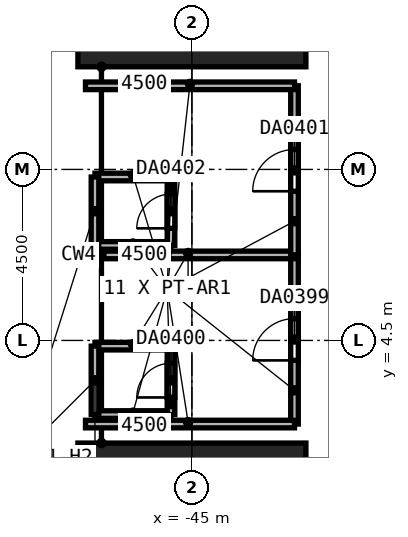
"""IFC4 building model, lengths in metres.
Left out: names, types, materials, properties, quantities, classifications, styles, units other than length and angle.
Written with IfcOpenShell. Run it as: python <this file> out.ifc"""

import sys

from ifc_helpers import new_model, si_unit, direction, frame, frame_2d, origin, origin_2d, place, context, subcontext, project, spatial, rectangle, extrude, element, fill, save


model = new_model("IFC4")
c1 = context("Model", 3, precision=1e-05, world=origin(), true_north=direction((0.0, 1.0)))
c2 = subcontext(c1, "Body", "Model", "MODEL_VIEW")
j1 = project(units=[si_unit("LENGTHUNIT", "METRE"), si_unit("PLANEANGLEUNIT", "RADIAN")], contexts=[c1])
p1 = place(None, origin())
s1 = spatial("IfcSite", under=j1, at=p1, CompositionType="ELEMENT")
p2 = place(p1, origin())
s2 = spatial("IfcBuilding", under=s1, at=p2, CompositionType="ELEMENT")
p3 = place(p2, frame((0.0, 0.0, 25.0)))
s3 = spatial("IfcBuildingStorey", under=s2, at=p3, CompositionType="ELEMENT", Elevation=25.0)
for number, where, z_axis, x_axis in (
    (1, (-45.0, 0.0, 0.0), (0.0, 0.0, 1.0), (0.0, 1.0, 0.0)),
    (2, (-45.0, 13.5, 0.0), (0.0, 0.0, 1.0), (0.0, 1.0, 0.0)),
):
    element("IfcColumn", number, at=place(p3, frame(where, z_axis=z_axis, x_axis=x_axis)), inside=s3, PredefinedType="COLUMN", context=c2, shape_type="SweptSolid", body=[
        extrude(rectangle(XDim=3.6, YDim=6.0, at=origin_2d()), origin(), (0.0, 0.0, 1.0), 6.0),
    ])
p4 = place(p3, frame((-42.3, 2.3, 0.0), z_axis=(0.0, 0.0, 1.0), x_axis=(0.0, 1.0, 0.0)))
e3 = element("IfcWall", 3, at=p4, inside=s3, PredefinedType="PARTITIONING", context=c2, shape_type="SweptSolid", body=[
    extrude(rectangle(XDim=4.45, YDim=0.2, at=frame_2d((2.225, 0.0))), origin(), (0.0, 0.0, 1.0), 5.7),
])
p5 = place(p4, frame((1.675, 0.0, 0.0)))
e4 = element("IfcOpeningElement", 4, at=p5, cuts=e3, PredefinedType="OPENING", context=c2, shape_type="SweptSolid", body=[
    extrude(rectangle(XDim=1.1, YDim=2.4, at=frame_2d((0.55, 1.2))), frame((0.0, 0.1, 0.0), z_axis=(0.0, -1.0, 0.0), x_axis=(1.0, 0.0, 0.0)), (0.0, 0.0, 1.0), 0.2),
])
for number, where, z_axis, x_axis in (
    (5, (-42.3, 2.3, 0.0), (0.0, 0.0, 1.0), (-1.0, 0.0, 0.0)),
    (6, (-47.8, 6.75, 0.0), (0.0, 0.0, 1.0), (1.0, 0.0, 0.0)),
):
    element("IfcWall", number, at=place(p3, frame(where, z_axis=z_axis, x_axis=x_axis)), inside=s3, PredefinedType="PARTITIONING", context=c2, shape_type="SweptSolid", body=[
        extrude(rectangle(XDim=5.5, YDim=0.2, at=frame_2d((2.75, 0.0))), origin(), (0.0, 0.0, 1.0), 5.7),
    ])
for number, where, z_axis, x_axis in (
    (7, (-47.55, 2.55, 0.0), (0.0, 0.0, 1.0), (1.0, 0.0, 0.0)),
    (8, (-45.55, 4.35, 0.0), (0.0, 0.0, 1.0), (-1.0, 0.0, 0.0)),
):
    element("IfcWall", number, at=place(p3, frame(where, z_axis=z_axis, x_axis=x_axis)), inside=s3, PredefinedType="PARTITIONING", context=c2, shape_type="SweptSolid", body=[
        extrude(rectangle(XDim=2.0, YDim=0.2, at=frame_2d((1.0, 0.0))), origin(), (0.0, 0.0, 1.0), 5.7),
    ])
p6 = place(p3, frame((-47.55, 2.55, 0.0), z_axis=(0.0, 0.0, 1.0), x_axis=(0.0, 1.0, 0.0)))
e9 = element("IfcWall", 9, at=p6, inside=s3, PredefinedType="PARTITIONING", context=c2, shape_type="SweptSolid", body=[
    extrude(rectangle(XDim=1.8, YDim=0.2, at=frame_2d((0.9, 0.0))), origin(), (0.0, 0.0, 1.0), 4.5),
])
p7 = place(p3, frame((-45.55, 2.55, 0.0), z_axis=(0.0, 0.0, 1.0), x_axis=(0.0, 1.0, 0.0)))
e10 = element("IfcWall", 10, at=p7, inside=s3, PredefinedType="PARTITIONING", context=c2, shape_type="SweptSolid", body=[
    extrude(rectangle(XDim=1.8, YDim=0.2, at=frame_2d((0.9, 0.0))), origin(), (0.0, 0.0, 1.0), 5.7),
])
p8 = place(p7, frame((0.45, 0.0, 0.0)))
e11 = element("IfcOpeningElement", 11, at=p8, cuts=e10, PredefinedType="OPENING", context=c2, shape_type="SweptSolid", body=[
    extrude(rectangle(XDim=0.9, YDim=2.1, at=frame_2d((0.45, 1.05))), frame((0.0, 0.1, 0.0), z_axis=(0.0, -1.0, 0.0), x_axis=(1.0, 0.0, 0.0)), (0.0, 0.0, 1.0), 0.2),
])
p9 = place(p3, frame((-42.3, 6.75, 0.0), z_axis=(0.0, 0.0, 1.0), x_axis=(0.0, 1.0, 0.0)))
e12 = element("IfcWall", 12, at=p9, inside=s3, PredefinedType="PARTITIONING", context=c2, shape_type="SweptSolid", body=[
    extrude(rectangle(XDim=4.45, YDim=0.2, at=frame_2d((2.225, 0.0))), origin(), (0.0, 0.0, 1.0), 5.7),
])
p10 = place(p9, frame((1.675, 0.0, 0.0)))
e13 = element("IfcOpeningElement", 13, at=p10, cuts=e12, PredefinedType="OPENING", context=c2, shape_type="SweptSolid", body=[
    extrude(rectangle(XDim=1.1, YDim=2.4, at=frame_2d((0.55, 1.2))), frame((0.0, 0.1, 0.0), z_axis=(0.0, -1.0, 0.0), x_axis=(1.0, 0.0, 0.0)), (0.0, 0.0, 1.0), 0.2),
])
p11 = place(p3, frame((-42.3, 11.2, 0.0), z_axis=(0.0, 0.0, 1.0), x_axis=(-1.0, 0.0, 0.0)))
e14 = element("IfcWall", 14, at=p11, inside=s3, PredefinedType="PARTITIONING", context=c2, shape_type="SweptSolid", body=[
    extrude(rectangle(XDim=5.5, YDim=0.2, at=frame_2d((2.75, 0.0))), origin(), (0.0, 0.0, 1.0), 5.7),
])
for number, where, z_axis, x_axis in (
    (15, (-47.55, 7.0, 0.0), (0.0, 0.0, 1.0), (1.0, 0.0, 0.0)),
    (16, (-45.55, 8.8, 0.0), (0.0, 0.0, 1.0), (-1.0, 0.0, 0.0)),
):
    element("IfcWall", number, at=place(p3, frame(where, z_axis=z_axis, x_axis=x_axis)), inside=s3, PredefinedType="PARTITIONING", context=c2, shape_type="SweptSolid", body=[
        extrude(rectangle(XDim=2.0, YDim=0.2, at=frame_2d((1.0, 0.0))), origin(), (0.0, 0.0, 1.0), 5.7),
    ])
p12 = place(p3, frame((-47.55, 7.0, 0.0), z_axis=(0.0, 0.0, 1.0), x_axis=(0.0, 1.0, 0.0)))
e17 = element("IfcWall", 17, at=p12, inside=s3, PredefinedType="PARTITIONING", context=c2, shape_type="SweptSolid", body=[
    extrude(rectangle(XDim=1.8, YDim=0.2, at=frame_2d((0.9, 0.0))), origin(), (0.0, 0.0, 1.0), 4.5),
])
p13 = place(p3, frame((-45.55, 7.0, 0.0), z_axis=(0.0, 0.0, 1.0), x_axis=(0.0, 1.0, 0.0)))
e18 = element("IfcWall", 18, at=p13, inside=s3, PredefinedType="PARTITIONING", context=c2, shape_type="SweptSolid", body=[
    extrude(rectangle(XDim=1.8, YDim=0.2, at=frame_2d((0.9, 0.0))), origin(), (0.0, 0.0, 1.0), 5.7),
])
p14 = place(p13, frame((0.45, 0.0, 0.0)))
e19 = element("IfcOpeningElement", 19, at=p14, cuts=e18, PredefinedType="OPENING", context=c2, shape_type="SweptSolid", body=[
    extrude(rectangle(XDim=0.9, YDim=2.1, at=frame_2d((0.45, 1.05))), frame((0.0, 0.1, 0.0), z_axis=(0.0, -1.0, 0.0), x_axis=(1.0, 0.0, 0.0)), (0.0, 0.0, 1.0), 0.2),
])
p15 = place(p5, origin())
e20 = element("IfcDoor", 20, at=p15, inside=s3, OperationType="DOUBLE_DOOR_SINGLE_SWING", PredefinedType="DOOR", context=c2, shape_type="SweptSolid", body=[
    extrude(rectangle(XDim=1.1, YDim=2.4, at=frame_2d((0.55, 1.2))), frame((0.0, 0.025, 0.0), z_axis=(0.0, -1.0, 0.0), x_axis=(1.0, 0.0, 0.0)), (0.0, 0.0, 1.0), 0.05),
])
fill(e4, e20)
p16 = place(p8, origin())
e21 = element("IfcDoor", 21, at=p16, inside=s3, OperationType="SINGLE_SWING_LEFT", PredefinedType="DOOR", context=c2, shape_type="SweptSolid", body=[
    extrude(rectangle(XDim=0.9, YDim=2.1, at=frame_2d((0.45, 1.05))), frame((0.0, 0.025, 0.0), z_axis=(0.0, -1.0, 0.0), x_axis=(1.0, 0.0, 0.0)), (0.0, 0.0, 1.0), 0.05),
])
fill(e11, e21)
p17 = place(p10, origin())
e22 = element("IfcDoor", 22, at=p17, inside=s3, OperationType="DOUBLE_DOOR_SINGLE_SWING", PredefinedType="DOOR", context=c2, shape_type="SweptSolid", body=[
    extrude(rectangle(XDim=1.1, YDim=2.4, at=frame_2d((0.55, 1.2))), frame((0.0, 0.025, 0.0), z_axis=(0.0, -1.0, 0.0), x_axis=(1.0, 0.0, 0.0)), (0.0, 0.0, 1.0), 0.05),
])
fill(e13, e22)
p18 = place(p14, origin())
e23 = element("IfcDoor", 23, at=p18, inside=s3, OperationType="SINGLE_SWING_LEFT", PredefinedType="DOOR", context=c2, shape_type="SweptSolid", body=[
    extrude(rectangle(XDim=0.9, YDim=2.1, at=frame_2d((0.45, 1.05))), frame((0.0, 0.025, 0.0), z_axis=(0.0, -1.0, 0.0), x_axis=(1.0, 0.0, 0.0)), (0.0, 0.0, 1.0), 0.05),
])
fill(e19, e23)
save(model, sys.argv[1])
